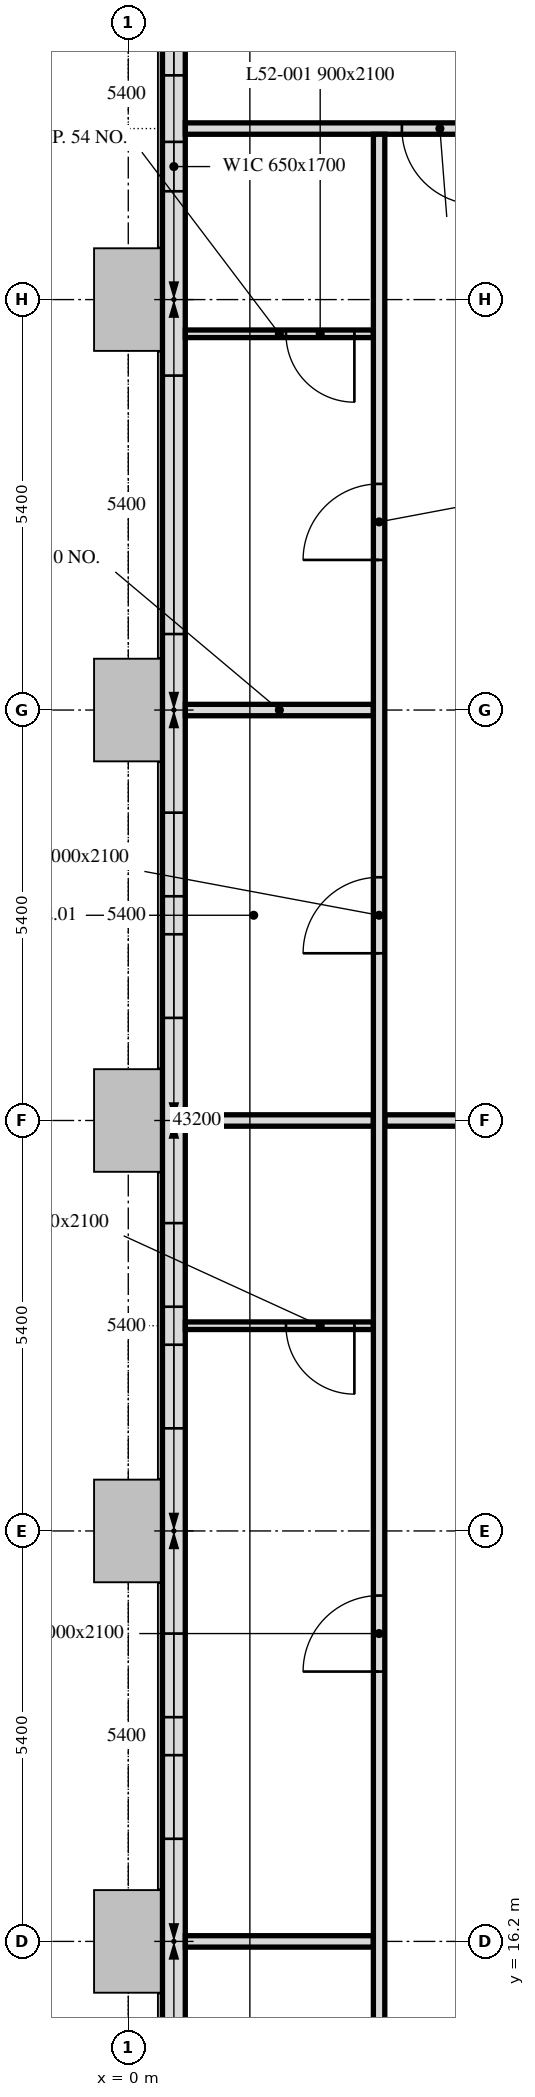
"""IFC4 building model, lengths in metres.
Left out: names, types, materials, properties, quantities, classifications, styles, units other than length and angle.
Written with IfcOpenShell. Run it as: python <this file> out.ifc"""

import sys

from ifc_helpers import new_model, si_unit, direction, frame, frame_2d, origin, place, context, subcontext, project, spatial, rectangle, extrude, element, fill, save


model = new_model("IFC4")
c1 = context("Model", 3, precision=1e-05, world=origin(), true_north=direction((0.0, 1.0)))
c2 = subcontext(c1, "Body", "Model", "MODEL_VIEW")
j1 = project(units=[si_unit("LENGTHUNIT", "METRE"), si_unit("PLANEANGLEUNIT", "RADIAN")], contexts=[c1])
p1 = place(None, origin())
s1 = spatial("IfcSite", under=j1, at=p1, CompositionType="ELEMENT")
p2 = place(p1, origin())
s2 = spatial("IfcBuilding", under=s1, at=p2, CompositionType="ELEMENT")
p3 = place(p2, frame((0.0, 0.0, 210.4)))
s3 = spatial("IfcBuildingStorey", under=s2, at=p3, CompositionType="ELEMENT", Elevation=210.4)
p4 = place(p3, frame((0.6, 43.014, 0.0), z_axis=(0.0, 0.0, 1.0), x_axis=(0.0, -1.0, 0.0)))
e1 = element("IfcWall", 1, at=p4, inside=s3, PredefinedType="SOLIDWALL", context=c2, shape_type="SweptSolid", body=[
    extrude(rectangle(XDim=32.027, YDim=0.3, at=frame_2d((16.014, 0.0))), origin(), (0.0, 0.0, 1.0), 3.0),
])
p5 = place(p4, frame((1.164, 0.0, 0.9)))
e2 = element("IfcOpeningElement", 2, at=p5, cuts=e1, PredefinedType="OPENING", context=c2, shape_type="SweptSolid", body=[
    extrude(rectangle(XDim=1.1, YDim=1.7, at=frame_2d((0.55, 0.85))), frame((0.0, 0.16, 0.0), z_axis=(0.0, -1.0, 0.0), x_axis=(1.0, 0.0, 0.0)), (0.0, 0.0, 1.0), 0.32),
])
p6 = place(p4, frame((3.139, 0.0, 0.9)))
e3 = element("IfcOpeningElement", 3, at=p6, cuts=e1, PredefinedType="OPENING", context=c2, shape_type="SweptSolid", body=[
    extrude(rectangle(XDim=0.65, YDim=1.7, at=frame_2d((0.325, 0.85))), frame((0.0, 0.16, 0.0), z_axis=(0.0, -1.0, 0.0), x_axis=(1.0, 0.0, 0.0)), (0.0, 0.0, 1.0), 0.32),
])
p7 = place(p4, frame((6.214, 0.0, 0.9)))
e4 = element("IfcOpeningElement", 4, at=p7, cuts=e1, PredefinedType="OPENING", context=c2, shape_type="SweptSolid", body=[
    extrude(rectangle(XDim=3.4, YDim=1.7, at=frame_2d((1.7, 0.85))), frame((0.0, 0.16, 0.0), z_axis=(0.0, -1.0, 0.0), x_axis=(1.0, 0.0, 0.0)), (0.0, 0.0, 1.0), 0.32),
])
p8 = place(p4, frame((11.964, 0.0, 0.9)))
e5 = element("IfcOpeningElement", 5, at=p8, cuts=e1, PredefinedType="OPENING", context=c2, shape_type="SweptSolid", body=[
    extrude(rectangle(XDim=1.1, YDim=1.7, at=frame_2d((0.55, 0.85))), frame((0.0, 0.16, 0.0), z_axis=(0.0, -1.0, 0.0), x_axis=(1.0, 0.0, 0.0)), (0.0, 0.0, 1.0), 0.32),
])
p9 = place(p4, frame((13.564, 0.0, 0.9)))
e6 = element("IfcOpeningElement", 6, at=p9, cuts=e1, PredefinedType="OPENING", context=c2, shape_type="SweptSolid", body=[
    extrude(rectangle(XDim=1.1, YDim=1.7, at=frame_2d((0.55, 0.85))), frame((0.0, 0.16, 0.0), z_axis=(0.0, -1.0, 0.0), x_axis=(1.0, 0.0, 0.0)), (0.0, 0.0, 1.0), 0.32),
])
p10 = place(p4, frame((17.364, 0.0, 0.9)))
e7 = element("IfcOpeningElement", 7, at=p10, cuts=e1, PredefinedType="OPENING", context=c2, shape_type="SweptSolid", body=[
    extrude(rectangle(XDim=1.1, YDim=1.7, at=frame_2d((0.55, 0.85))), frame((0.0, 0.16, 0.0), z_axis=(0.0, -1.0, 0.0), x_axis=(1.0, 0.0, 0.0)), (0.0, 0.0, 1.0), 0.32),
])
p11 = place(p4, frame((18.964, 0.0, 0.9)))
e8 = element("IfcOpeningElement", 8, at=p11, cuts=e1, PredefinedType="OPENING", context=c2, shape_type="SweptSolid", body=[
    extrude(rectangle(XDim=1.1, YDim=1.7, at=frame_2d((0.55, 0.85))), frame((0.0, 0.16, 0.0), z_axis=(0.0, -1.0, 0.0), x_axis=(1.0, 0.0, 0.0)), (0.0, 0.0, 1.0), 0.32),
])
p12 = place(p4, frame((22.764, 0.0, 0.9)))
e9 = element("IfcOpeningElement", 9, at=p12, cuts=e1, PredefinedType="OPENING", context=c2, shape_type="SweptSolid", body=[
    extrude(rectangle(XDim=1.1, YDim=1.7, at=frame_2d((0.55, 0.85))), frame((0.0, 0.16, 0.0), z_axis=(0.0, -1.0, 0.0), x_axis=(1.0, 0.0, 0.0)), (0.0, 0.0, 1.0), 0.32),
])
p13 = place(p4, frame((24.364, 0.0, 0.9)))
e10 = element("IfcOpeningElement", 10, at=p13, cuts=e1, PredefinedType="OPENING", context=c2, shape_type="SweptSolid", body=[
    extrude(rectangle(XDim=1.1, YDim=1.7, at=frame_2d((0.55, 0.85))), frame((0.0, 0.16, 0.0), z_axis=(0.0, -1.0, 0.0), x_axis=(1.0, 0.0, 0.0)), (0.0, 0.0, 1.0), 0.32),
])
p14 = place(p4, frame((28.164, 0.0, 0.9)))
e11 = element("IfcOpeningElement", 11, at=p14, cuts=e1, PredefinedType="OPENING", context=c2, shape_type="SweptSolid", body=[
    extrude(rectangle(XDim=1.1, YDim=1.7, at=frame_2d((0.55, 0.85))), frame((0.0, 0.16, 0.0), z_axis=(0.0, -1.0, 0.0), x_axis=(1.0, 0.0, 0.0)), (0.0, 0.0, 1.0), 0.32),
])
p15 = place(p4, frame((29.764, 0.0, 0.9)))
e12 = element("IfcOpeningElement", 12, at=p15, cuts=e1, PredefinedType="OPENING", context=c2, shape_type="SweptSolid", body=[
    extrude(rectangle(XDim=1.1, YDim=1.7, at=frame_2d((0.55, 0.85))), frame((0.0, 0.16, 0.0), z_axis=(0.0, -1.0, 0.0), x_axis=(1.0, 0.0, 0.0)), (0.0, 0.0, 1.0), 0.32),
])
p16 = place(p3, frame((0.751, 32.4, 0.0), z_axis=(0.0, 0.0, 1.0), x_axis=(1.0, 0.0, 0.0)))
e13 = element("IfcWall", 13, at=p16, inside=s3, PredefinedType="PARTITIONING", context=c2, shape_type="SweptSolid", body=[
    extrude(rectangle(XDim=2.474, YDim=0.15, at=frame_2d((1.237, 0.0))), origin(), (0.0, 0.0, 1.0), 2.4),
])
p17 = place(p3, frame((3.225, 37.35, 0.0), z_axis=(0.0, 0.0, 1.0), x_axis=(-1.0, 0.0, 0.0)))
e14 = element("IfcWall", 14, at=p17, inside=s3, PredefinedType="PARTITIONING", context=c2, shape_type="SweptSolid", body=[
    extrude(rectangle(XDim=2.474, YDim=0.1, at=frame_2d((1.237, 0.0))), origin(), (0.0, 0.0, 1.0), 3.0),
])
p18 = place(p17, frame((0.25, 0.0, 0.0)))
e15 = element("IfcOpeningElement", 15, at=p18, cuts=e14, PredefinedType="OPENING", context=c2, shape_type="SweptSolid", body=[
    extrude(rectangle(XDim=0.9, YDim=2.1, at=frame_2d((0.45, 1.05))), frame((0.0, 0.05, 0.0), z_axis=(0.0, -1.0, 0.0), x_axis=(1.0, 0.0, 0.0)), (0.0, 0.0, 1.0), 0.1),
])
p19 = place(p3, frame((42.449, 40.05, 0.0), z_axis=(0.0, 0.0, 1.0), x_axis=(-1.0, 0.0, 0.0)))
e16 = element("IfcWall", 16, at=p19, inside=s3, PredefinedType="PARTITIONING", context=c2, shape_type="SweptSolid", body=[
    extrude(rectangle(XDim=41.698, YDim=0.15, at=frame_2d((20.849, 0.0))), origin(), (0.0, 0.0, 1.0), 2.4),
])
p20 = place(p19, frame((2.249, 0.0, 0.0)))
e17 = element("IfcOpeningElement", 17, at=p20, cuts=e16, PredefinedType="OPENING", context=c2, shape_type="SweptSolid", body=[
    extrude(rectangle(XDim=1.0, YDim=2.1, at=frame_2d((0.5, 1.05))), frame((0.0, 0.075, 0.0), z_axis=(0.0, -1.0, 0.0), x_axis=(1.0, 0.0, 0.0)), (0.0, 0.0, 1.0), 0.15),
])
p21 = place(p19, frame((6.849, 0.0, 0.0)))
e18 = element("IfcOpeningElement", 18, at=p21, cuts=e16, PredefinedType="OPENING", context=c2, shape_type="SweptSolid", body=[
    extrude(rectangle(XDim=1.0, YDim=2.1, at=frame_2d((0.5, 1.05))), frame((0.0, 0.075, 0.0), z_axis=(0.0, -1.0, 0.0), x_axis=(1.0, 0.0, 0.0)), (0.0, 0.0, 1.0), 0.15),
])
p22 = place(p19, frame((18.449, 0.0, 0.0)))
e19 = element("IfcOpeningElement", 19, at=p22, cuts=e16, PredefinedType="OPENING", context=c2, shape_type="SweptSolid", body=[
    extrude(rectangle(XDim=1.0, YDim=2.1, at=frame_2d((0.5, 1.05))), frame((0.0, 0.075, 0.0), z_axis=(0.0, -1.0, 0.0), x_axis=(1.0, 0.0, 0.0)), (0.0, 0.0, 1.0), 0.15),
])
p23 = place(p19, frame((23.049, 0.0, 0.0)))
e20 = element("IfcOpeningElement", 20, at=p23, cuts=e16, PredefinedType="OPENING", context=c2, shape_type="SweptSolid", body=[
    extrude(rectangle(XDim=1.0, YDim=2.1, at=frame_2d((0.5, 1.05))), frame((0.0, 0.075, 0.0), z_axis=(0.0, -1.0, 0.0), x_axis=(1.0, 0.0, 0.0)), (0.0, 0.0, 1.0), 0.15),
])
p24 = place(p19, frame((37.849, 0.0, 0.0)))
e21 = element("IfcOpeningElement", 21, at=p24, cuts=e16, PredefinedType="OPENING", context=c2, shape_type="SweptSolid", body=[
    extrude(rectangle(XDim=1.0, YDim=2.1, at=frame_2d((0.5, 1.05))), frame((0.0, 0.075, 0.0), z_axis=(0.0, -1.0, 0.0), x_axis=(1.0, 0.0, 0.0)), (0.0, 0.0, 1.0), 0.15),
])
p25 = place(p3, frame((0.751, 27.0, 0.0), z_axis=(0.0, 0.0, 1.0), x_axis=(1.0, 0.0, 0.0)))
e22 = element("IfcWall", 22, at=p25, inside=s3, PredefinedType="PARTITIONING", context=c2, shape_type="SweptSolid", body=[
    extrude(rectangle(XDim=2.474, YDim=0.15, at=frame_2d((1.237, 0.0))), origin(), (0.0, 0.0, 1.0), 2.4),
])
p26 = place(p3, frame((3.375, 27.0, 0.0), z_axis=(0.0, 0.0, 1.0), x_axis=(1.0, 0.0, 0.0)))
e23 = element("IfcWall", 23, at=p26, inside=s3, PredefinedType="PARTITIONING", context=c2, shape_type="SweptSolid", body=[
    extrude(rectangle(XDim=2.025, YDim=0.15, at=frame_2d((1.012, 0.0))), origin(), (0.0, 0.0, 1.0), 2.4),
])
p27 = place(p3, frame((3.225, 16.2, 0.0), z_axis=(0.0, 0.0, 1.0), x_axis=(-1.0, 0.0, 0.0)))
e24 = element("IfcWall", 24, at=p27, inside=s3, PredefinedType="PARTITIONING", context=c2, shape_type="SweptSolid", body=[
    extrude(rectangle(XDim=2.474, YDim=0.15, at=frame_2d((1.237, 0.0))), origin(), (0.0, 0.0, 1.0), 2.4),
])
p28 = place(p3, frame((3.225, 24.3, 0.0), z_axis=(0.0, 0.0, 1.0), x_axis=(-1.0, 0.0, 0.0)))
e25 = element("IfcWall", 25, at=p28, inside=s3, PredefinedType="PARTITIONING", context=c2, shape_type="SweptSolid", body=[
    extrude(rectangle(XDim=2.474, YDim=0.1, at=frame_2d((1.237, 0.0))), origin(), (0.0, 0.0, 1.0), 3.0),
])
p29 = place(p28, frame((0.25, 0.0, 0.0)))
e26 = element("IfcOpeningElement", 26, at=p29, cuts=e25, PredefinedType="OPENING", context=c2, shape_type="SweptSolid", body=[
    extrude(rectangle(XDim=0.9, YDim=2.1, at=frame_2d((0.45, 1.05))), frame((0.0, 0.05, 0.0), z_axis=(0.0, -1.0, 0.0), x_axis=(1.0, 0.0, 0.0)), (0.0, 0.0, 1.0), 0.1),
])
p30 = place(p3, frame((3.3, 11.775, 0.0), z_axis=(0.0, 0.0, 1.0), x_axis=(0.0, 1.0, 0.0)))
e27 = element("IfcWall", 27, at=p30, inside=s3, PredefinedType="PARTITIONING", context=c2, shape_type="SweptSolid", body=[
    extrude(rectangle(XDim=28.2, YDim=0.15, at=frame_2d((14.1, 0.0))), origin(), (0.0, 0.0, 1.0), 2.4),
])
p31 = place(p30, frame((17.425, 0.0, 0.0)))
e28 = element("IfcOpeningElement", 28, at=p31, cuts=e27, PredefinedType="OPENING", context=c2, shape_type="SweptSolid", body=[
    extrude(rectangle(XDim=1.0, YDim=2.1, at=frame_2d((0.5, 1.05))), frame((0.0, 0.075, 0.0), z_axis=(0.0, -1.0, 0.0), x_axis=(1.0, 0.0, 0.0)), (0.0, 0.0, 1.0), 0.15),
])
p32 = place(p30, frame((1.675, 0.0, 0.0)))
e29 = element("IfcOpeningElement", 29, at=p32, cuts=e27, PredefinedType="OPENING", context=c2, shape_type="SweptSolid", body=[
    extrude(rectangle(XDim=1.0, YDim=2.1, at=frame_2d((0.5, 1.05))), frame((0.0, 0.075, 0.0), z_axis=(0.0, -1.0, 0.0), x_axis=(1.0, 0.0, 0.0)), (0.0, 0.0, 1.0), 0.15),
])
p33 = place(p30, frame((22.6, 0.0, 0.0)))
e30 = element("IfcOpeningElement", 30, at=p33, cuts=e27, PredefinedType="OPENING", context=c2, shape_type="SweptSolid", body=[
    extrude(rectangle(XDim=1.0, YDim=2.1, at=frame_2d((0.5, 1.05))), frame((0.0, 0.075, 0.0), z_axis=(0.0, -1.0, 0.0), x_axis=(1.0, 0.0, 0.0)), (0.0, 0.0, 1.0), 0.15),
])
p34 = place(p30, frame((7.975, 0.0, 0.0)))
e31 = element("IfcOpeningElement", 31, at=p34, cuts=e27, PredefinedType="OPENING", context=c2, shape_type="SweptSolid", body=[
    extrude(rectangle(XDim=1.0, YDim=2.1, at=frame_2d((0.5, 1.05))), frame((0.0, 0.075, 0.0), z_axis=(0.0, -1.0, 0.0), x_axis=(1.0, 0.0, 0.0)), (0.0, 0.0, 1.0), 0.15),
])
p35 = place(p5, origin())
e32 = element("IfcWindow", 32, at=p35, inside=s3, PartitioningType="SINGLE_PANEL", PredefinedType="WINDOW", context=c2, shape_type="SweptSolid", body=[
    extrude(rectangle(XDim=1.1, YDim=1.7, at=frame_2d((0.55, 0.85))), frame((0.0, 0.03, 0.0), z_axis=(0.0, -1.0, 0.0), x_axis=(1.0, 0.0, 0.0)), (0.0, 0.0, 1.0), 0.06),
])
fill(e2, e32)
p36 = place(p6, origin())
e33 = element("IfcWindow", 33, at=p36, inside=s3, PartitioningType="SINGLE_PANEL", PredefinedType="WINDOW", context=c2, shape_type="SweptSolid", body=[
    extrude(rectangle(XDim=0.65, YDim=1.7, at=frame_2d((0.325, 0.85))), frame((0.0, 0.03, 0.0), z_axis=(0.0, -1.0, 0.0), x_axis=(1.0, 0.0, 0.0)), (0.0, 0.0, 1.0), 0.06),
])
fill(e3, e33)
p37 = place(p7, origin())
e34 = element("IfcWindow", 34, at=p37, inside=s3, PartitioningType="SINGLE_PANEL", PredefinedType="WINDOW", context=c2, shape_type="SweptSolid", body=[
    extrude(rectangle(XDim=3.4, YDim=1.7, at=frame_2d((1.7, 0.85))), frame((0.0, 0.03, 0.0), z_axis=(0.0, -1.0, 0.0), x_axis=(1.0, 0.0, 0.0)), (0.0, 0.0, 1.0), 0.06),
])
fill(e4, e34)
p38 = place(p8, origin())
e35 = element("IfcWindow", 35, at=p38, inside=s3, PartitioningType="SINGLE_PANEL", PredefinedType="WINDOW", context=c2, shape_type="SweptSolid", body=[
    extrude(rectangle(XDim=1.1, YDim=1.7, at=frame_2d((0.55, 0.85))), frame((0.0, 0.03, 0.0), z_axis=(0.0, -1.0, 0.0), x_axis=(1.0, 0.0, 0.0)), (0.0, 0.0, 1.0), 0.06),
])
fill(e5, e35)
p39 = place(p9, origin())
e36 = element("IfcWindow", 36, at=p39, inside=s3, PartitioningType="SINGLE_PANEL", PredefinedType="WINDOW", context=c2, shape_type="SweptSolid", body=[
    extrude(rectangle(XDim=1.1, YDim=1.7, at=frame_2d((0.55, 0.85))), frame((0.0, 0.03, 0.0), z_axis=(0.0, -1.0, 0.0), x_axis=(1.0, 0.0, 0.0)), (0.0, 0.0, 1.0), 0.06),
])
fill(e6, e36)
p40 = place(p10, origin())
e37 = element("IfcWindow", 37, at=p40, inside=s3, PartitioningType="SINGLE_PANEL", PredefinedType="WINDOW", context=c2, shape_type="SweptSolid", body=[
    extrude(rectangle(XDim=1.1, YDim=1.7, at=frame_2d((0.55, 0.85))), frame((0.0, 0.03, 0.0), z_axis=(0.0, -1.0, 0.0), x_axis=(1.0, 0.0, 0.0)), (0.0, 0.0, 1.0), 0.06),
])
fill(e7, e37)
p41 = place(p11, origin())
e38 = element("IfcWindow", 38, at=p41, inside=s3, PartitioningType="SINGLE_PANEL", PredefinedType="WINDOW", context=c2, shape_type="SweptSolid", body=[
    extrude(rectangle(XDim=1.1, YDim=1.7, at=frame_2d((0.55, 0.85))), frame((0.0, 0.03, 0.0), z_axis=(0.0, -1.0, 0.0), x_axis=(1.0, 0.0, 0.0)), (0.0, 0.0, 1.0), 0.06),
])
fill(e8, e38)
p42 = place(p12, origin())
e39 = element("IfcWindow", 39, at=p42, inside=s3, PartitioningType="SINGLE_PANEL", PredefinedType="WINDOW", context=c2, shape_type="SweptSolid", body=[
    extrude(rectangle(XDim=1.1, YDim=1.7, at=frame_2d((0.55, 0.85))), frame((0.0, 0.03, 0.0), z_axis=(0.0, -1.0, 0.0), x_axis=(1.0, 0.0, 0.0)), (0.0, 0.0, 1.0), 0.06),
])
fill(e9, e39)
p43 = place(p13, origin())
e40 = element("IfcWindow", 40, at=p43, inside=s3, PartitioningType="SINGLE_PANEL", PredefinedType="WINDOW", context=c2, shape_type="SweptSolid", body=[
    extrude(rectangle(XDim=1.1, YDim=1.7, at=frame_2d((0.55, 0.85))), frame((0.0, 0.03, 0.0), z_axis=(0.0, -1.0, 0.0), x_axis=(1.0, 0.0, 0.0)), (0.0, 0.0, 1.0), 0.06),
])
fill(e10, e40)
p44 = place(p18, origin())
e41 = element("IfcDoor", 41, at=p44, inside=s3, OperationType="SINGLE_SWING_LEFT", PredefinedType="DOOR", context=c2, shape_type="SweptSolid", body=[
    extrude(rectangle(XDim=0.9, YDim=2.1, at=frame_2d((0.45, 1.05))), frame((0.0, 0.025, 0.0), z_axis=(0.0, -1.0, 0.0), x_axis=(1.0, 0.0, 0.0)), (0.0, 0.0, 1.0), 0.05),
])
fill(e15, e41)
p45 = place(p31, origin())
e42 = element("IfcDoor", 42, at=p45, inside=s3, OperationType="SINGLE_SWING_RIGHT", PredefinedType="DOOR", context=c2, shape_type="SweptSolid", body=[
    extrude(rectangle(XDim=1.0, YDim=2.1, at=frame_2d((0.5, 1.05))), frame((0.0, 0.025, 0.0), z_axis=(0.0, -1.0, 0.0), x_axis=(1.0, 0.0, 0.0)), (0.0, 0.0, 1.0), 0.05),
])
fill(e28, e42)
p46 = place(p29, origin())
e43 = element("IfcDoor", 43, at=p46, inside=s3, OperationType="SINGLE_SWING_RIGHT", PredefinedType="DOOR", context=c2, shape_type="SweptSolid", body=[
    extrude(rectangle(XDim=0.9, YDim=2.1, at=frame_2d((0.45, 1.05))), frame((0.0, 0.025, 0.0), z_axis=(0.0, -1.0, 0.0), x_axis=(1.0, 0.0, 0.0)), (0.0, 0.0, 1.0), 0.05),
])
fill(e26, e43)
p47 = place(p33, origin())
e44 = element("IfcDoor", 44, at=p47, inside=s3, OperationType="SINGLE_SWING_RIGHT", PredefinedType="DOOR", context=c2, shape_type="SweptSolid", body=[
    extrude(rectangle(XDim=1.0, YDim=2.1, at=frame_2d((0.5, 1.05))), frame((0.0, 0.025, 0.0), z_axis=(0.0, -1.0, 0.0), x_axis=(1.0, 0.0, 0.0)), (0.0, 0.0, 1.0), 0.05),
])
fill(e30, e44)
p48 = place(p24, origin())
e45 = element("IfcDoor", 45, at=p48, inside=s3, OperationType="SINGLE_SWING_RIGHT", PredefinedType="DOOR", context=c2, shape_type="SweptSolid", body=[
    extrude(rectangle(XDim=1.0, YDim=2.1, at=frame_2d((0.5, 1.05))), frame((0.0, 0.025, 0.0), z_axis=(0.0, -1.0, 0.0), x_axis=(1.0, 0.0, 0.0)), (0.0, 0.0, 1.0), 0.05),
])
fill(e21, e45)
p49 = place(p34, origin())
e46 = element("IfcDoor", 46, at=p49, inside=s3, OperationType="SINGLE_SWING_RIGHT", PredefinedType="DOOR", context=c2, shape_type="SweptSolid", body=[
    extrude(rectangle(XDim=1.0, YDim=2.1, at=frame_2d((0.5, 1.05))), frame((0.0, 0.025, 0.0), z_axis=(0.0, -1.0, 0.0), x_axis=(1.0, 0.0, 0.0)), (0.0, 0.0, 1.0), 0.05),
])
fill(e31, e46)
save(model, sys.argv[1])
